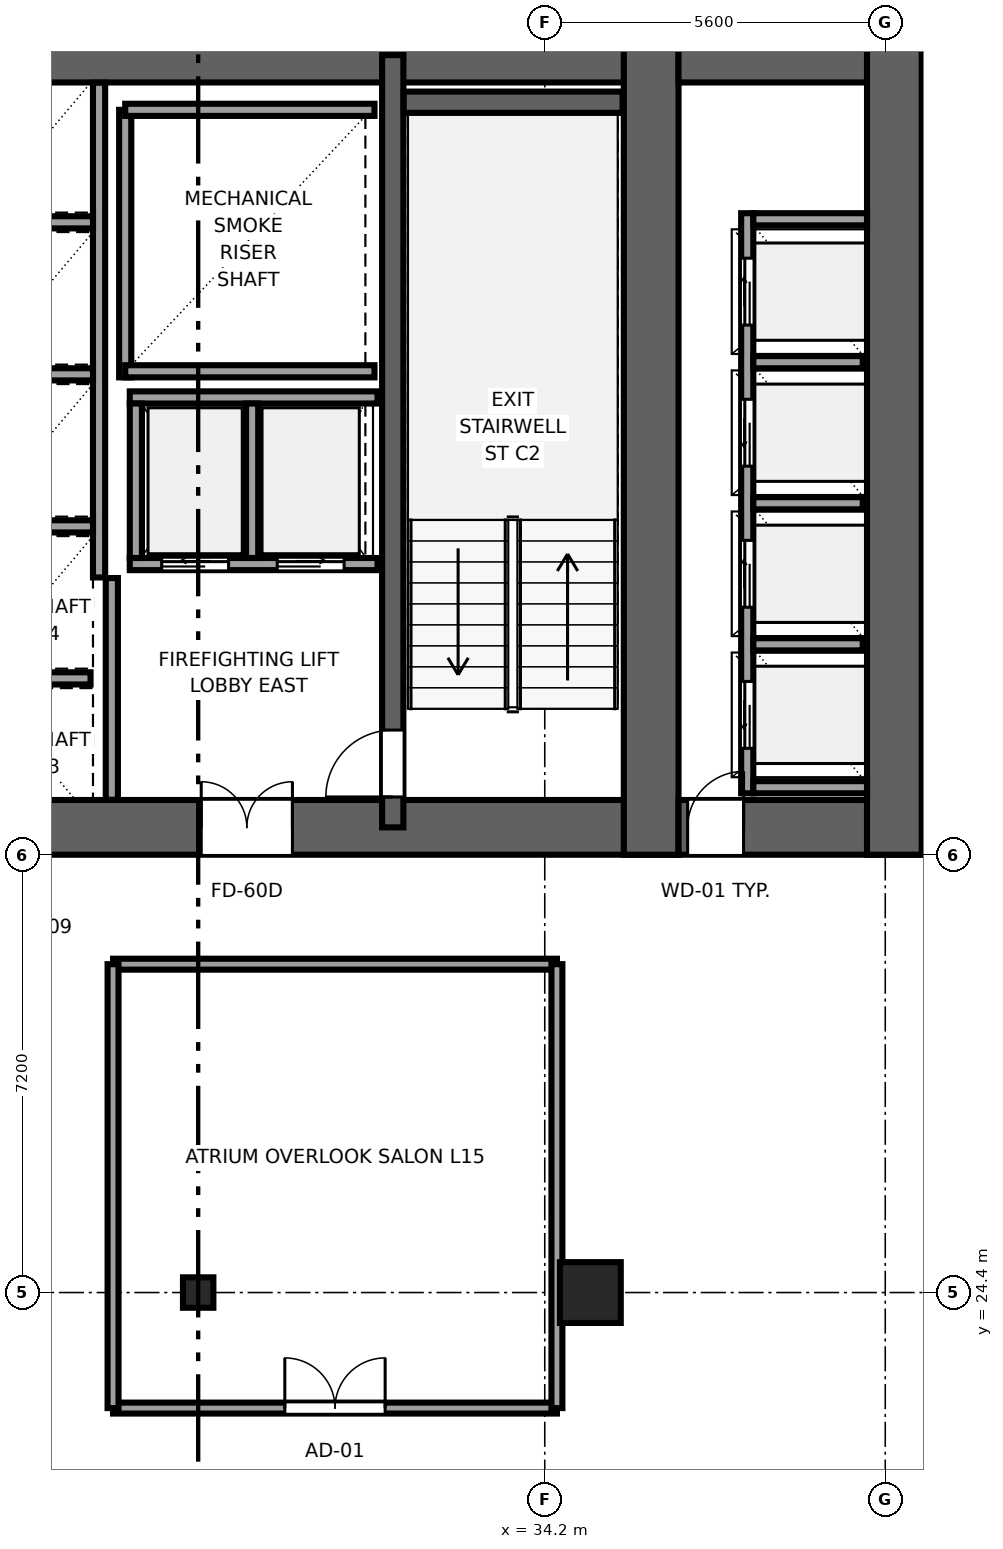
"""IFC4 building model, lengths in metres.
Left out: names, types, materials, properties, quantities, classifications, styles, units other than length and angle.
Written with IfcOpenShell. Run it as: python <this file> out.ifc"""

import sys

from ifc_helpers import new_model, si_unit, direction, frame, frame_2d, origin, origin_2d, place, context, subcontext, project, spatial, rectangle, i_section, extrude, source, transform, mapped, element, fill, save


model = new_model("IFC4")
c1 = context("Model", 3, precision=1e-05, world=origin(), true_north=direction((0.0, 1.0)))
c2 = subcontext(c1, "Body", "Model", "MODEL_VIEW")
j1 = project(units=[si_unit("LENGTHUNIT", "METRE"), si_unit("PLANEANGLEUNIT", "RADIAN")], contexts=[c1])
p1 = place(None, origin())
s1 = spatial("IfcSite", under=j1, at=p1, CompositionType="ELEMENT")
p2 = place(p1, origin())
s2 = spatial("IfcBuilding", under=s1, at=p2, CompositionType="ELEMENT")
p3 = place(p2, frame((0.0, 0.0, 63.95)))
s3 = spatial("IfcBuildingStorey", under=s2, at=p3, CompositionType="ELEMENT", Elevation=63.95)
p4 = place(p3, frame((9.6, 32.05, 0.0), z_axis=(0.0, 0.0, 1.0), x_axis=(1.0, 0.0, 0.0)))
e1 = element("IfcWall", 1, at=p4, inside=s3, PredefinedType="SHEAR", context=c2, shape_type="SweptSolid", body=[
    extrude(rectangle(XDim=26.8, YDim=0.9, at=frame_2d((13.4, 0.0))), origin(), (0.0, 0.0, 1.0), 3.55),
])
p5 = place(p4, frame((7.85, 0.0, 0.0), z_axis=(0.0, 0.0, 1.0), x_axis=(-1.0, 0.0, 0.0)))
e2 = element("IfcOpeningElement", 2, at=p5, cuts=e1, PredefinedType="OPENING", context=c2, shape_type="SweptSolid", body=[
    extrude(rectangle(XDim=1.5, YDim=2.04, at=frame_2d((0.75, 1.02))), frame((0.0, 0.46, 0.0), z_axis=(0.0, -1.0, 0.0), x_axis=(1.0, 0.0, 0.0)), (0.0, 0.0, 1.0), 0.92),
])
p6 = place(p4, frame((14.15, 0.0, 0.0), z_axis=(0.0, 0.0, 1.0), x_axis=(-1.0, 0.0, 0.0)))
e3 = element("IfcOpeningElement", 3, at=p6, cuts=e1, PredefinedType="OPENING", context=c2, shape_type="SweptSolid", body=[
    extrude(rectangle(XDim=1.5, YDim=2.04, at=frame_2d((0.75, 1.02))), frame((0.0, 0.46, 0.0), z_axis=(0.0, -1.0, 0.0), x_axis=(1.0, 0.0, 0.0)), (0.0, 0.0, 1.0), 0.92),
])
p7 = place(p4, frame((20.45, 0.0, 0.0), z_axis=(0.0, 0.0, 1.0), x_axis=(-1.0, 0.0, 0.0)))
e4 = element("IfcOpeningElement", 4, at=p7, cuts=e1, PredefinedType="OPENING", context=c2, shape_type="SweptSolid", body=[
    extrude(rectangle(XDim=1.5, YDim=2.04, at=frame_2d((0.75, 1.02))), frame((0.0, 0.46, 0.0), z_axis=(0.0, -1.0, 0.0), x_axis=(1.0, 0.0, 0.0)), (0.0, 0.0, 1.0), 0.92),
])
p8 = place(p3, frame((9.6, 44.75, 0.0), z_axis=(0.0, 0.0, 1.0), x_axis=(1.0, 0.0, 0.0)))
e5 = element("IfcWall", 5, at=p8, inside=s3, PredefinedType="SHEAR", context=c2, shape_type="SweptSolid", body=[
    extrude(rectangle(XDim=26.8, YDim=0.9, at=frame_2d((13.4, 0.0))), origin(), (0.0, 0.0, 1.0), 3.55),
])
p9 = place(p3, frame((35.95, 31.6, 0.0), z_axis=(0.0, 0.0, 1.0), x_axis=(0.0, 1.0, 0.0)))
e6 = element("IfcWall", 6, at=p9, inside=s3, PredefinedType="SHEAR", context=c2, shape_type="SweptSolid", body=[
    extrude(rectangle(XDim=13.6, YDim=0.9, at=frame_2d((6.8, 0.0))), origin(), (0.0, 0.0, 1.0), 3.55),
])
p10 = place(p3, frame((31.7, 32.05, 0.0), z_axis=(0.0, 0.0, 1.0), x_axis=(0.0, 1.0, 0.0)))
e7 = element("IfcWall", 7, at=p10, inside=s3, PredefinedType="SHEAR", context=c2, shape_type="SweptSolid", body=[
    extrude(rectangle(XDim=12.7, YDim=0.35, at=frame_2d((6.35, 0.0))), origin(), (0.0, 0.0, 1.0), 3.55),
])
p11 = place(p10, frame((1.6, 0.0, 0.0), z_axis=(0.0, 0.0, 1.0), x_axis=(-1.0, 0.0, 0.0)))
e8 = element("IfcOpeningElement", 8, at=p11, cuts=e7, PredefinedType="OPENING", context=c2, shape_type="SweptSolid", body=[
    extrude(rectangle(XDim=1.1, YDim=2.12, at=frame_2d((0.55, 1.06))), frame((0.0, 0.185, 0.0), z_axis=(0.0, -1.0, 0.0), x_axis=(1.0, 0.0, 0.0)), (0.0, 0.0, 1.0), 0.37),
])
p12 = place(p3, frame((36.4, 32.05, 0.0), z_axis=(0.0, 0.0, 1.0), x_axis=(1.0, 0.0, 0.0)))
e9 = element("IfcWall", 9, at=p12, inside=s3, PredefinedType="SHEAR", context=c2, shape_type="SweptSolid", body=[
    extrude(rectangle(XDim=4.0, YDim=0.9, at=frame_2d((2.0, 0.0))), origin(), (0.0, 0.0, 1.0), 3.55),
])
p13 = place(p12, frame((1.07, 0.0, 0.0), z_axis=(0.0, 0.0, 1.0), x_axis=(-1.0, 0.0, 0.0)))
e10 = element("IfcOpeningElement", 10, at=p13, cuts=e9, PredefinedType="OPENING", context=c2, shape_type="SweptSolid", body=[
    extrude(rectangle(XDim=0.92, YDim=2.01, at=frame_2d((0.46, 1.005))), frame((0.0, 0.46, 0.0), z_axis=(0.0, -1.0, 0.0), x_axis=(1.0, 0.0, 0.0)), (0.0, 0.0, 1.0), 0.92),
])
p14 = place(p3, frame((36.4, 44.75, 0.0), z_axis=(0.0, 0.0, 1.0), x_axis=(1.0, 0.0, 0.0)))
e11 = element("IfcWall", 11, at=p14, inside=s3, PredefinedType="SHEAR", context=c2, shape_type="SweptSolid", body=[
    extrude(rectangle(XDim=4.0, YDim=0.9, at=frame_2d((2.0, 0.0))), origin(), (0.0, 0.0, 1.0), 3.55),
])
p15 = place(p3, frame((39.95, 31.6, 0.0), z_axis=(0.0, 0.0, 1.0), x_axis=(0.0, 1.0, 0.0)))
e12 = element("IfcWall", 12, at=p15, inside=s3, PredefinedType="SHEAR", context=c2, shape_type="SweptSolid", body=[
    extrude(rectangle(XDim=13.6, YDim=0.9, at=frame_2d((6.8, 0.0))), origin(), (0.0, 0.0, 1.0), 3.55),
])
p16 = place(p3, frame((31.88, 43.975, 0.0), z_axis=(0.0, 0.0, 1.0), x_axis=(1.0, 0.0, 0.0)))
e13 = element("IfcWall", 13, at=p16, inside=s3, PredefinedType="SHEAR", context=c2, shape_type="SweptSolid", body=[
    extrude(rectangle(XDim=3.6, YDim=0.35, at=frame_2d((1.8, 0.0))), origin(), (0.0, 0.0, 1.0), 3.55),
])
m1 = source(origin(), c2, "Body", "SweptSolid", [
    extrude(rectangle(XDim=1.0, YDim=1.0, at=origin_2d()), origin(), (0.0, 0.0, 1.0), 3.55),
])
p17 = place(p3, frame((34.95, 24.4, 0.0), z_axis=(0.0, 0.0, 1.0), x_axis=(1.0, 0.0, 0.0)))
e14 = element("IfcColumn", 14, at=p17, inside=s3, PredefinedType="COLUMN", context=c2, shape_type="MappedRepresentation", body=[
    mapped(m1, transform((0.0, 0.0, 0.0), x_axis=(1.0, 0.0, 0.0), y_axis=(0.0, 1.0, 0.0), z_axis=(0.0, 0.0, 1.0), scale=1.0)),
])
m2 = source(origin(), c2, "Body", "SweptSolid", [
    extrude(i_section(OverallWidth=0.5, OverallDepth=0.5, WebThickness=0.028, FlangeThickness=0.045, at=origin_2d()), origin(), (0.0, 0.0, 1.0), 3.55),
])
p18 = place(p3, frame((28.5, 24.4, 0.0), z_axis=(0.0, 0.0, 1.0), x_axis=(1.0, 0.0, 0.0)))
e15 = element("IfcColumn", 15, at=p18, inside=s3, PredefinedType="COLUMN", context=c2, shape_type="MappedRepresentation", body=[
    mapped(m2, transform((0.0, 0.0, 0.0), x_axis=(1.0, 0.0, 0.0), y_axis=(0.0, 1.0, 0.0), z_axis=(0.0, 0.0, 1.0), scale=1.0)),
])
p19 = place(p3, frame((27.3, 39.45, 0.0), z_axis=(0.0, 0.0, 1.0), x_axis=(0.0, 1.0, 0.0)))
e16 = element("IfcWall", 16, at=p19, inside=s3, PredefinedType="SOLIDWALL", context=c2, shape_type="SweptSolid", body=[
    extrude(rectangle(XDim=4.4, YDim=0.2, at=frame_2d((2.2, 0.0))), origin(), (0.0, 0.0, 1.0), 3.37),
])
for number, where, z_axis, x_axis in (
    (17, (27.3, 39.55, 0.0), (0.0, 0.0, 1.0), (1.0, 0.0, 0.0)),
    (18, (27.3, 43.85, 0.0), (0.0, 0.0, 1.0), (1.0, 0.0, 0.0)),
):
    element("IfcWall", number, at=place(p3, frame(where, z_axis=z_axis, x_axis=x_axis)), inside=s3, PredefinedType="SOLIDWALL", context=c2, shape_type="SweptSolid", body=[
        extrude(rectangle(XDim=4.1, YDim=0.2, at=frame_2d((2.05, 0.0))), origin(), (0.0, 0.0, 1.0), 3.37),
    ])
p20 = place(p3, frame((27.08, 32.504, 0.0), z_axis=(0.0, 0.0, 1.0), x_axis=(0.0, 1.0, 0.0)))
e19 = element("IfcWall", 19, at=p20, inside=s3, PredefinedType="SOLIDWALL", context=c2, shape_type="SweptSolid", body=[
    extrude(rectangle(XDim=3.646, YDim=0.2, at=frame_2d((1.823, 0.0))), origin(), (0.0, 0.0, 1.0), 3.37),
])
p21 = place(p3, frame((27.375, 36.38, 0.0), z_axis=(0.0, 0.0, 1.0), x_axis=(1.0, 0.0, 0.0)))
e20 = element("IfcWall", 20, at=p21, inside=s3, PredefinedType="SOLIDWALL", context=c2, shape_type="SweptSolid", body=[
    extrude(rectangle(XDim=4.075, YDim=0.2, at=frame_2d((2.038, 0.0))), origin(), (0.0, 0.0, 1.0), 3.37),
])
p22 = place(p21, frame((0.525, 0.0, 0.0)))
e21 = element("IfcOpeningElement", 21, at=p22, cuts=e20, PredefinedType="OPENING", context=c2, shape_type="SweptSolid", body=[
    extrude(rectangle(XDim=1.1, YDim=2.12, at=frame_2d((0.55, 1.06))), frame((0.0, 0.11, 0.0), z_axis=(0.0, -1.0, 0.0), x_axis=(1.0, 0.0, 0.0)), (0.0, 0.0, 1.0), 0.22),
])
p23 = place(p21, frame((2.425, 0.0, 0.0)))
e22 = element("IfcOpeningElement", 22, at=p23, cuts=e20, PredefinedType="OPENING", context=c2, shape_type="SweptSolid", body=[
    extrude(rectangle(XDim=1.1, YDim=2.12, at=frame_2d((0.55, 1.06))), frame((0.0, 0.11, 0.0), z_axis=(0.0, -1.0, 0.0), x_axis=(1.0, 0.0, 0.0)), (0.0, 0.0, 1.0), 0.22),
])
p24 = place(p3, frame((27.375, 39.12, 0.0), z_axis=(0.0, 0.0, 1.0), x_axis=(1.0, 0.0, 0.0)))
e23 = element("IfcWall", 23, at=p24, inside=s3, PredefinedType="SOLIDWALL", context=c2, shape_type="SweptSolid", body=[
    extrude(rectangle(XDim=4.075, YDim=0.2, at=frame_2d((2.038, 0.0))), origin(), (0.0, 0.0, 1.0), 3.37),
])
for number, where, z_axis, x_axis in (
    (24, (27.475, 36.48, 0.0), (0.0, 0.0, 1.0), (0.0, 1.0, 0.0)),
    (25, (29.387, 36.48, 0.0), (0.0, 0.0, 1.0), (0.0, 1.0, 0.0)),
):
    element("IfcWall", number, at=place(p3, frame(where, z_axis=z_axis, x_axis=x_axis)), inside=s3, PredefinedType="SOLIDWALL", context=c2, shape_type="SweptSolid", body=[
        extrude(rectangle(XDim=2.54, YDim=0.2, at=frame_2d((1.27, 0.0))), origin(), (0.0, 0.0, 1.0), 3.37),
    ])
p25 = place(p3, frame((26.87, 36.16, 0.0), z_axis=(0.0, 0.0, 1.0), x_axis=(0.0, 1.0, 0.0)))
e26 = element("IfcWall", 26, at=p25, inside=s3, PredefinedType="SOLIDWALL", context=c2, shape_type="SweptSolid", body=[
    extrude(rectangle(XDim=8.136, YDim=0.2, at=frame_2d((4.068, 0.0))), origin(), (0.0, 0.0, 1.0), 3.37),
])
p26 = place(p3, frame((24.93, 34.5, 0.0), z_axis=(0.0, 0.0, 1.0), x_axis=(1.0, 0.0, 0.0)))
e27 = element("IfcWall", 27, at=p26, inside=s3, PredefinedType="SOLIDWALL", context=c2, shape_type="SweptSolid", body=[
    extrude(rectangle(XDim=1.8, YDim=0.2, at=frame_2d((0.9, 0.0))), origin(), (0.0, 0.0, 1.0), 3.37),
])
for number, where, z_axis, x_axis in (
    (28, (24.93, 37.0, 0.0), (0.0, 0.0, 1.0), (1.0, 0.0, 0.0)),
    (29, (24.93, 39.5, 0.0), (0.0, 0.0, 1.0), (1.0, 0.0, 0.0)),
    (30, (24.93, 42.0, 0.0), (0.0, 0.0, 1.0), (1.0, 0.0, 0.0)),
):
    element("IfcWall", number, at=place(p3, frame(where, z_axis=z_axis, x_axis=x_axis)), inside=s3, PredefinedType="SOLIDWALL", context=c2, shape_type="SweptSolid", body=[
        extrude(rectangle(XDim=1.84, YDim=0.2, at=frame_2d((0.92, 0.0))), origin(), (0.0, 0.0, 1.0), 3.37),
    ])
p27 = place(p3, frame((37.53, 32.61, 0.0), z_axis=(0.0, 0.0, 1.0), x_axis=(0.0, 1.0, 0.0)))
e31 = element("IfcWall", 31, at=p27, inside=s3, PredefinedType="SOLIDWALL", context=c2, shape_type="SweptSolid", body=[
    extrude(rectangle(XDim=9.54, YDim=0.2, at=frame_2d((4.77, 0.0))), origin(), (0.0, 0.0, 1.0), 3.37),
])
p28 = place(p27, frame((0.74, 0.0, 0.0)))
e32 = element("IfcOpeningElement", 32, at=p28, cuts=e31, PredefinedType="OPENING", context=c2, shape_type="SweptSolid", body=[
    extrude(rectangle(XDim=1.1, YDim=2.12, at=frame_2d((0.55, 1.06))), frame((0.0, 0.11, 0.0), z_axis=(0.0, -1.0, 0.0), x_axis=(1.0, 0.0, 0.0)), (0.0, 0.0, 1.0), 0.22),
])
p29 = place(p27, frame((3.06, 0.0, 0.0)))
e33 = element("IfcOpeningElement", 33, at=p29, cuts=e31, PredefinedType="OPENING", context=c2, shape_type="SweptSolid", body=[
    extrude(rectangle(XDim=1.1, YDim=2.12, at=frame_2d((0.55, 1.06))), frame((0.0, 0.11, 0.0), z_axis=(0.0, -1.0, 0.0), x_axis=(1.0, 0.0, 0.0)), (0.0, 0.0, 1.0), 0.22),
])
p30 = place(p27, frame((5.38, 0.0, 0.0)))
e34 = element("IfcOpeningElement", 34, at=p30, cuts=e31, PredefinedType="OPENING", context=c2, shape_type="SweptSolid", body=[
    extrude(rectangle(XDim=1.1, YDim=2.12, at=frame_2d((0.55, 1.06))), frame((0.0, 0.11, 0.0), z_axis=(0.0, -1.0, 0.0), x_axis=(1.0, 0.0, 0.0)), (0.0, 0.0, 1.0), 0.22),
])
p31 = place(p27, frame((7.7, 0.0, 0.0)))
e35 = element("IfcOpeningElement", 35, at=p31, cuts=e31, PredefinedType="OPENING", context=c2, shape_type="SweptSolid", body=[
    extrude(rectangle(XDim=1.1, YDim=2.12, at=frame_2d((0.55, 1.06))), frame((0.0, 0.11, 0.0), z_axis=(0.0, -1.0, 0.0), x_axis=(1.0, 0.0, 0.0)), (0.0, 0.0, 1.0), 0.22),
])
for number, where, z_axis, x_axis in (
    (36, (37.63, 32.71, 0.0), (0.0, 0.0, 1.0), (1.0, 0.0, 0.0)),
    (37, (37.63, 42.05, 0.0), (0.0, 0.0, 1.0), (1.0, 0.0, 0.0)),
):
    element("IfcWall", number, at=place(p3, frame(where, z_axis=z_axis, x_axis=x_axis)), inside=s3, PredefinedType="SOLIDWALL", context=c2, shape_type="SweptSolid", body=[
        extrude(rectangle(XDim=1.87, YDim=0.2, at=frame_2d((0.935, 0.0))), origin(), (0.0, 0.0, 1.0), 3.37),
    ])
for number, where, z_axis, x_axis in (
    (38, (37.63, 35.06, 0.0), (0.0, 0.0, 1.0), (1.0, 0.0, 0.0)),
    (39, (37.63, 37.38, 0.0), (0.0, 0.0, 1.0), (1.0, 0.0, 0.0)),
    (40, (37.63, 39.7, 0.0), (0.0, 0.0, 1.0), (1.0, 0.0, 0.0)),
):
    element("IfcWall", number, at=place(p3, frame(where, z_axis=z_axis, x_axis=x_axis)), inside=s3, PredefinedType="SOLIDWALL", context=c2, shape_type="SweptSolid", body=[
        extrude(rectangle(XDim=1.8, YDim=0.2, at=frame_2d((0.9, 0.0))), origin(), (0.0, 0.0, 1.0), 3.37),
    ])
p32 = place(p3, frame((27.1, 22.5, 0.0), z_axis=(0.0, 0.0, 1.0), x_axis=(1.0, 0.0, 0.0)))
e41 = element("IfcWall", 41, at=p32, inside=s3, PredefinedType="PARTITIONING", context=c2, shape_type="SweptSolid", body=[
    extrude(rectangle(XDim=7.3, YDim=0.18, at=frame_2d((3.65, 0.0))), origin(), (0.0, 0.0, 1.0), 3.37),
])
p33 = place(p32, frame((2.825, 0.0, 0.0)))
e42 = element("IfcOpeningElement", 42, at=p33, cuts=e41, PredefinedType="OPENING", context=c2, shape_type="SweptSolid", body=[
    extrude(rectangle(XDim=1.65, YDim=2.15, at=frame_2d((0.825, 1.075))), frame((0.0, 0.1, 0.0), z_axis=(0.0, -1.0, 0.0), x_axis=(1.0, 0.0, 0.0)), (0.0, 0.0, 1.0), 0.2),
])
p34 = place(p3, frame((27.1, 29.8, 0.0), z_axis=(0.0, 0.0, 1.0), x_axis=(1.0, 0.0, 0.0)))
e43 = element("IfcWall", 43, at=p34, inside=s3, PredefinedType="PARTITIONING", context=c2, shape_type="SweptSolid", body=[
    extrude(rectangle(XDim=7.3, YDim=0.18, at=frame_2d((3.65, 0.0))), origin(), (0.0, 0.0, 1.0), 3.37),
])
for number, where, z_axis, x_axis in (
    (44, (27.1, 22.5, 0.0), (0.0, 0.0, 1.0), (0.0, 1.0, 0.0)),
    (45, (34.4, 22.5, 0.0), (0.0, 0.0, 1.0), (0.0, 1.0, 0.0)),
):
    element("IfcWall", number, at=place(p3, frame(where, z_axis=z_axis, x_axis=x_axis)), inside=s3, PredefinedType="PARTITIONING", context=c2, shape_type="SweptSolid", body=[
        extrude(rectangle(XDim=7.3, YDim=0.18, at=frame_2d((3.65, 0.0))), origin(), (0.0, 0.0, 1.0), 3.37),
    ])
m3 = source(origin(), c2, "Body", "SweptSolid", [
    extrude(rectangle(XDim=1.1, YDim=2.12, at=frame_2d((0.55, 1.06))), frame((0.0, 0.025, 0.0), z_axis=(0.0, -1.0, 0.0), x_axis=(1.0, 0.0, 0.0)), (0.0, 0.0, 1.0), 0.05),
])
p35 = place(p11, origin())
e46 = element("IfcDoor", 46, at=p35, inside=s3, OperationType="SINGLE_SWING_LEFT", PredefinedType="DOOR", context=c2, shape_type="MappedRepresentation", body=[
    mapped(m3, transform((0.0, 0.0, 0.0), x_axis=(1.0, 0.0, 0.0), y_axis=(0.0, 1.0, 0.0), z_axis=(0.0, 0.0, 1.0), scale=1.0)),
])
fill(e8, e46)
m4 = source(origin(), c2, "Body", "SweptSolid", [
    extrude(rectangle(XDim=1.5, YDim=2.04, at=frame_2d((0.75, 1.02))), frame((0.0, 0.025, 0.0), z_axis=(0.0, -1.0, 0.0), x_axis=(1.0, 0.0, 0.0)), (0.0, 0.0, 1.0), 0.05),
])
p36 = place(p7, origin())
e47 = element("IfcDoor", 47, at=p36, inside=s3, OperationType="DOUBLE_DOOR_SINGLE_SWING", PredefinedType="DOOR", context=c2, shape_type="MappedRepresentation", body=[
    mapped(m4, transform((0.0, 0.0, 0.0), x_axis=(1.0, 0.0, 0.0), y_axis=(0.0, 1.0, 0.0), z_axis=(0.0, 0.0, 1.0), scale=1.0)),
])
fill(e4, e47)
m5 = source(origin(), c2, "Body", "SweptSolid", [
    extrude(rectangle(XDim=0.92, YDim=2.01, at=frame_2d((0.46, 1.005))), frame((0.0, 0.025, 0.0), z_axis=(0.0, -1.0, 0.0), x_axis=(1.0, 0.0, 0.0)), (0.0, 0.0, 1.0), 0.05),
])
p37 = place(p13, origin())
e48 = element("IfcDoor", 48, at=p37, inside=s3, OperationType="SINGLE_SWING_RIGHT", PredefinedType="DOOR", context=c2, shape_type="MappedRepresentation", body=[
    mapped(m5, transform((0.0, 0.0, 0.0), x_axis=(1.0, 0.0, 0.0), y_axis=(0.0, 1.0, 0.0), z_axis=(0.0, 0.0, 1.0), scale=1.0)),
])
fill(e10, e48)
m6 = source(origin(), c2, "Body", "SweptSolid", [
    extrude(rectangle(XDim=1.1, YDim=2.12, at=frame_2d((0.55, 1.06))), frame((0.0, 0.025, 0.0), z_axis=(0.0, -1.0, 0.0), x_axis=(1.0, 0.0, 0.0)), (0.0, 0.0, 1.0), 0.05),
])
p38 = place(p22, origin())
e49 = element("IfcDoor", 49, at=p38, inside=s3, OperationType="SLIDING_TO_LEFT", PredefinedType="DOOR", context=c2, shape_type="MappedRepresentation", body=[
    mapped(m6, transform((0.0, 0.0, 0.0), x_axis=(1.0, 0.0, 0.0), y_axis=(0.0, 1.0, 0.0), z_axis=(0.0, 0.0, 1.0), scale=1.0)),
])
fill(e21, e49)
p39 = place(p23, origin())
e50 = element("IfcDoor", 50, at=p39, inside=s3, OperationType="SLIDING_TO_RIGHT", PredefinedType="DOOR", context=c2, shape_type="MappedRepresentation", body=[
    mapped(m6, transform((0.0, 0.0, 0.0), x_axis=(1.0, 0.0, 0.0), y_axis=(0.0, 1.0, 0.0), z_axis=(0.0, 0.0, 1.0), scale=1.0)),
])
fill(e22, e50)
p40 = place(p28, origin())
e51 = element("IfcDoor", 51, at=p40, inside=s3, OperationType="SLIDING_TO_LEFT", PredefinedType="DOOR", context=c2, shape_type="MappedRepresentation", body=[
    mapped(m6, transform((0.0, 0.0, 0.0), x_axis=(1.0, 0.0, 0.0), y_axis=(0.0, 1.0, 0.0), z_axis=(0.0, 0.0, 1.0), scale=1.0)),
])
fill(e32, e51)
p41 = place(p29, origin())
e52 = element("IfcDoor", 52, at=p41, inside=s3, OperationType="SLIDING_TO_RIGHT", PredefinedType="DOOR", context=c2, shape_type="MappedRepresentation", body=[
    mapped(m6, transform((0.0, 0.0, 0.0), x_axis=(1.0, 0.0, 0.0), y_axis=(0.0, 1.0, 0.0), z_axis=(0.0, 0.0, 1.0), scale=1.0)),
])
fill(e33, e52)
p42 = place(p30, origin())
e53 = element("IfcDoor", 53, at=p42, inside=s3, OperationType="SLIDING_TO_LEFT", PredefinedType="DOOR", context=c2, shape_type="MappedRepresentation", body=[
    mapped(m6, transform((0.0, 0.0, 0.0), x_axis=(1.0, 0.0, 0.0), y_axis=(0.0, 1.0, 0.0), z_axis=(0.0, 0.0, 1.0), scale=1.0)),
])
fill(e34, e53)
p43 = place(p31, origin())
e54 = element("IfcDoor", 54, at=p43, inside=s3, OperationType="SLIDING_TO_RIGHT", PredefinedType="DOOR", context=c2, shape_type="MappedRepresentation", body=[
    mapped(m6, transform((0.0, 0.0, 0.0), x_axis=(1.0, 0.0, 0.0), y_axis=(0.0, 1.0, 0.0), z_axis=(0.0, 0.0, 1.0), scale=1.0)),
])
fill(e35, e54)
m7 = source(origin(), c2, "Body", "SweptSolid", [
    extrude(rectangle(XDim=1.65, YDim=2.15, at=frame_2d((0.825, 1.075))), frame((0.0, 0.025, 0.0), z_axis=(0.0, -1.0, 0.0), x_axis=(1.0, 0.0, 0.0)), (0.0, 0.0, 1.0), 0.05),
])
p44 = place(p33, origin())
e55 = element("IfcDoor", 55, at=p44, inside=s3, OperationType="DOUBLE_DOOR_SINGLE_SWING", PredefinedType="DOOR", context=c2, shape_type="MappedRepresentation", body=[
    mapped(m7, transform((0.0, 0.0, 0.0), x_axis=(1.0, 0.0, 0.0), y_axis=(0.0, 1.0, 0.0), z_axis=(0.0, 0.0, 1.0), scale=1.0)),
])
fill(e42, e55)
save(model, sys.argv[1])
